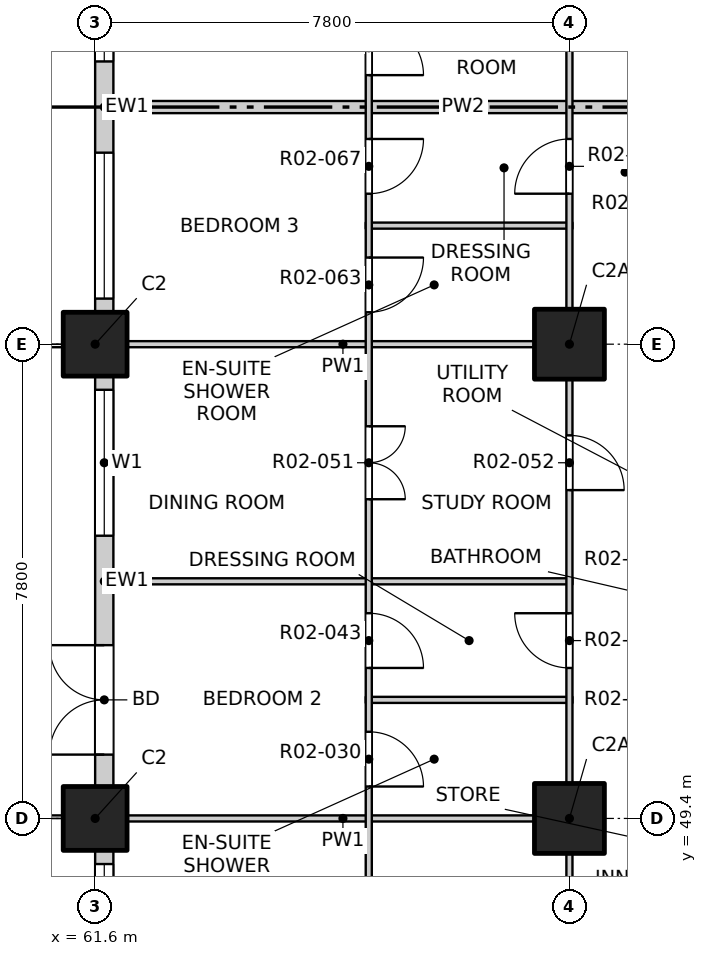
"""IFC4 building model, lengths in metres.
Left out: names, types, materials, properties, quantities, classifications, styles, units other than length and angle.
Written with IfcOpenShell. Run it as: python <this file> out.ifc"""

import sys

from ifc_helpers import new_model, si_unit, direction, frame, frame_2d, origin, origin_2d, place, context, subcontext, project, spatial, rectangle, extrude, element, fill, save


model = new_model("IFC4")
c1 = context("Model", 3, precision=1e-05, world=origin(), true_north=direction((0.0, 1.0)))
c2 = subcontext(c1, "Body", "Model", "MODEL_VIEW")
j1 = project(units=[si_unit("LENGTHUNIT", "METRE"), si_unit("PLANEANGLEUNIT", "RADIAN")], contexts=[c1])
p1 = place(None, origin())
s1 = spatial("IfcSite", under=j1, at=p1, CompositionType="ELEMENT")
p2 = place(p1, origin())
s2 = spatial("IfcBuilding", under=s1, at=p2, CompositionType="ELEMENT")
p3 = place(p2, frame((0.0, 0.0, 36.5)))
s3 = spatial("IfcBuildingStorey", under=s2, at=p3, CompositionType="ELEMENT", Elevation=36.5)
for number, where, z_axis, x_axis in (
    (1, (61.6, 49.4, -0.25), (0.0, 0.0, 1.0), (1.0, 0.0, 0.0)),
    (2, (61.6, 57.2, -0.25), (0.0, 0.0, 1.0), (1.0, 0.0, 0.0)),
):
    element("IfcColumn", number, at=place(p3, frame(where, z_axis=z_axis, x_axis=x_axis)), inside=s3, PredefinedType="COLUMN", context=c2, shape_type="SweptSolid", body=[
        extrude(rectangle(XDim=1.05, YDim=1.05, at=origin_2d()), origin(), (0.0, 0.0, 1.0), 3.4),
    ])
for number, where, z_axis, x_axis in (
    (3, (69.4, 49.4, -0.25), (0.0, 0.0, 1.0), (1.0, 0.0, 0.0)),
    (4, (69.4, 57.2, -0.25), (0.0, 0.0, 1.0), (1.0, 0.0, 0.0)),
):
    element("IfcColumn", number, at=place(p3, frame(where, z_axis=z_axis, x_axis=x_axis)), inside=s3, PredefinedType="COLUMN", context=c2, shape_type="SweptSolid", body=[
        extrude(rectangle(XDim=1.15, YDim=1.15, at=origin_2d()), origin(), (0.0, 0.0, 1.0), 3.4),
    ])
p4 = place(p3, frame((61.75, 45.5, 0.0), z_axis=(0.0, 0.0, 1.0), x_axis=(0.0, 1.0, 0.0)))
e5 = element("IfcWall", 5, at=p4, inside=s3, PredefinedType="SOLIDWALL", context=c2, shape_type="SweptSolid", body=[
    extrude(rectangle(XDim=3.375, YDim=0.3, at=frame_2d((1.688, 0.0))), origin(), (0.0, 0.0, 1.0), 2.7),
])
p5 = place(p4, frame((0.75, 0.0, 0.9)))
e6 = element("IfcOpeningElement", 6, at=p5, cuts=e5, PredefinedType="OPENING", context=c2, shape_type="SweptSolid", body=[
    extrude(rectangle(XDim=2.4, YDim=1.8, at=frame_2d((1.2, 0.9))), frame((0.0, 0.16, 0.0), z_axis=(0.0, -1.0, 0.0), x_axis=(1.0, 0.0, 0.0)), (0.0, 0.0, 1.0), 0.32),
])
p6 = place(p3, frame((61.75, 49.925, 0.0), z_axis=(0.0, 0.0, 1.0), x_axis=(0.0, 1.0, 0.0)))
e7 = element("IfcWall", 7, at=p6, inside=s3, PredefinedType="SOLIDWALL", context=c2, shape_type="SweptSolid", body=[
    extrude(rectangle(XDim=6.75, YDim=0.3, at=frame_2d((3.375, 0.0))), origin(), (0.0, 0.0, 1.0), 2.7),
])
p7 = place(p6, frame((0.525, 0.0, 0.0)))
e8 = element("IfcOpeningElement", 8, at=p7, cuts=e7, PredefinedType="OPENING", context=c2, shape_type="SweptSolid", body=[
    extrude(rectangle(XDim=1.8, YDim=2.4, at=frame_2d((0.9, 1.2))), frame((0.0, 0.16, 0.0), z_axis=(0.0, -1.0, 0.0), x_axis=(1.0, 0.0, 0.0)), (0.0, 0.0, 1.0), 0.32),
])
p8 = place(p6, frame((4.125, 0.0, 0.9)))
e9 = element("IfcOpeningElement", 9, at=p8, cuts=e7, PredefinedType="OPENING", context=c2, shape_type="SweptSolid", body=[
    extrude(rectangle(XDim=2.4, YDim=1.8, at=frame_2d((1.2, 0.9))), frame((0.0, 0.16, 0.0), z_axis=(0.0, -1.0, 0.0), x_axis=(1.0, 0.0, 0.0)), (0.0, 0.0, 1.0), 0.32),
])
p9 = place(p3, frame((61.75, 57.725, 0.0), z_axis=(0.0, 0.0, 1.0), x_axis=(0.0, 1.0, 0.0)))
e10 = element("IfcWall", 10, at=p9, inside=s3, PredefinedType="SOLIDWALL", context=c2, shape_type="SweptSolid", body=[
    extrude(rectangle(XDim=6.75, YDim=0.3, at=frame_2d((3.375, 0.0))), origin(), (0.0, 0.0, 1.0), 2.7),
])
p10 = place(p9, frame((0.225, 0.0, 0.9)))
e11 = element("IfcOpeningElement", 11, at=p10, cuts=e10, PredefinedType="OPENING", context=c2, shape_type="SweptSolid", body=[
    extrude(rectangle(XDim=2.4, YDim=1.8, at=frame_2d((1.2, 0.9))), frame((0.0, 0.16, 0.0), z_axis=(0.0, -1.0, 0.0), x_axis=(1.0, 0.0, 0.0)), (0.0, 0.0, 1.0), 0.32),
])
p11 = place(p9, frame((4.125, 0.0, 0.9)))
e12 = element("IfcOpeningElement", 12, at=p11, cuts=e10, PredefinedType="OPENING", context=c2, shape_type="SweptSolid", body=[
    extrude(rectangle(XDim=2.4, YDim=1.8, at=frame_2d((1.2, 0.9))), frame((0.0, 0.16, 0.0), z_axis=(0.0, -1.0, 0.0), x_axis=(1.0, 0.0, 0.0)), (0.0, 0.0, 1.0), 0.32),
])
p12 = place(p3, frame((61.9, 49.4, 0.0), z_axis=(0.0, 0.0, 1.0), x_axis=(1.0, 0.0, 0.0)))
e13 = element("IfcWall", 13, at=p12, inside=s3, PredefinedType="PARTITIONING", context=c2, shape_type="SweptSolid", body=[
    extrude(rectangle(XDim=7.55, YDim=0.1, at=frame_2d((3.775, 0.0))), origin(), (0.0, 0.0, 1.0), 3.15),
])
p13 = place(p3, frame((66.05, 51.35, 0.0), z_axis=(0.0, 0.0, 1.0), x_axis=(1.0, 0.0, 0.0)))
e14 = element("IfcWall", 14, at=p13, inside=s3, PredefinedType="PARTITIONING", context=c2, shape_type="SweptSolid", body=[
    extrude(rectangle(XDim=3.4, YDim=0.1, at=frame_2d((1.7, 0.0))), origin(), (0.0, 0.0, 1.0), 3.15),
])
p14 = place(p3, frame((61.9, 53.3, 0.0), z_axis=(0.0, 0.0, 1.0), x_axis=(1.0, 0.0, 0.0)))
e15 = element("IfcWall", 15, at=p14, inside=s3, PredefinedType="PARTITIONING", context=c2, shape_type="SweptSolid", body=[
    extrude(rectangle(XDim=7.55, YDim=0.1, at=frame_2d((3.775, 0.0))), origin(), (0.0, 0.0, 1.0), 3.15),
])
p15 = place(p3, frame((61.9, 57.2, 0.0), z_axis=(0.0, 0.0, 1.0), x_axis=(1.0, 0.0, 0.0)))
e16 = element("IfcWall", 16, at=p15, inside=s3, PredefinedType="PARTITIONING", context=c2, shape_type="SweptSolid", body=[
    extrude(rectangle(XDim=7.55, YDim=0.1, at=frame_2d((3.775, 0.0))), origin(), (0.0, 0.0, 1.0), 2.55),
])
p16 = place(p3, frame((66.05, 59.15, 0.0), z_axis=(0.0, 0.0, 1.0), x_axis=(1.0, 0.0, 0.0)))
e17 = element("IfcWall", 17, at=p16, inside=s3, PredefinedType="PARTITIONING", context=c2, shape_type="SweptSolid", body=[
    extrude(rectangle(XDim=3.4, YDim=0.1, at=frame_2d((1.7, 0.0))), origin(), (0.0, 0.0, 1.0), 3.15),
])
p17 = place(p3, frame((61.9, 61.1, 0.0), z_axis=(0.0, 0.0, 1.0), x_axis=(1.0, 0.0, 0.0)))
e18 = element("IfcWall", 18, at=p17, inside=s3, PredefinedType="PARTITIONING", context=c2, shape_type="SweptSolid", body=[
    extrude(rectangle(XDim=11.5, YDim=0.2, at=frame_2d((5.75, 0.0))), origin(), (0.0, 0.0, 1.0), 3.15),
])
p18 = place(p3, frame((66.1, 41.9, 0.0), z_axis=(0.0, 0.0, 1.0), x_axis=(0.0, 1.0, 0.0)))
e19 = element("IfcWall", 19, at=p18, inside=s3, PredefinedType="PARTITIONING", context=c2, shape_type="SweptSolid", body=[
    extrude(rectangle(XDim=34.7, YDim=0.1, at=frame_2d((17.35, 0.0))), origin(), (0.0, 0.0, 1.0), 3.15),
])
p19 = place(p18, frame((1.05, 0.0, 0.0)))
e20 = element("IfcOpeningElement", 20, at=p19, cuts=e19, PredefinedType="OPENING", context=c2, shape_type="SweptSolid", body=[
    extrude(rectangle(XDim=1.2, YDim=2.1, at=frame_2d((0.6, 1.05))), frame((0.0, 0.06, 0.0), z_axis=(0.0, -1.0, 0.0), x_axis=(1.0, 0.0, 0.0)), (0.0, 0.0, 1.0), 0.12),
])
p20 = place(p18, frame((4.95, 0.0, 0.0)))
e21 = element("IfcOpeningElement", 21, at=p20, cuts=e19, PredefinedType="OPENING", context=c2, shape_type="SweptSolid", body=[
    extrude(rectangle(XDim=1.2, YDim=2.1, at=frame_2d((0.6, 1.05))), frame((0.0, 0.06, 0.0), z_axis=(0.0, -1.0, 0.0), x_axis=(1.0, 0.0, 0.0)), (0.0, 0.0, 1.0), 0.12),
])
p21 = place(p18, frame((8.025, 0.0, 0.0)))
e22 = element("IfcOpeningElement", 22, at=p21, cuts=e19, PredefinedType="OPENING", context=c2, shape_type="SweptSolid", body=[
    extrude(rectangle(XDim=0.9, YDim=2.1, at=frame_2d((0.45, 1.05))), frame((0.0, 0.06, 0.0), z_axis=(0.0, -1.0, 0.0), x_axis=(1.0, 0.0, 0.0)), (0.0, 0.0, 1.0), 0.12),
])
p22 = place(p18, frame((9.975, 0.0, 0.0)))
e23 = element("IfcOpeningElement", 23, at=p22, cuts=e19, PredefinedType="OPENING", context=c2, shape_type="SweptSolid", body=[
    extrude(rectangle(XDim=0.9, YDim=2.1, at=frame_2d((0.45, 1.05))), frame((0.0, 0.06, 0.0), z_axis=(0.0, -1.0, 0.0), x_axis=(1.0, 0.0, 0.0)), (0.0, 0.0, 1.0), 0.12),
])
p23 = place(p18, frame((12.75, 0.0, 0.0)))
e24 = element("IfcOpeningElement", 24, at=p23, cuts=e19, PredefinedType="OPENING", context=c2, shape_type="SweptSolid", body=[
    extrude(rectangle(XDim=1.2, YDim=2.1, at=frame_2d((0.6, 1.05))), frame((0.0, 0.06, 0.0), z_axis=(0.0, -1.0, 0.0), x_axis=(1.0, 0.0, 0.0)), (0.0, 0.0, 1.0), 0.12),
])
p24 = place(p18, frame((15.825, 0.0, 0.0)))
e25 = element("IfcOpeningElement", 25, at=p24, cuts=e19, PredefinedType="OPENING", context=c2, shape_type="SweptSolid", body=[
    extrude(rectangle(XDim=0.9, YDim=2.1, at=frame_2d((0.45, 1.05))), frame((0.0, 0.06, 0.0), z_axis=(0.0, -1.0, 0.0), x_axis=(1.0, 0.0, 0.0)), (0.0, 0.0, 1.0), 0.12),
])
p25 = place(p18, frame((17.775, 0.0, 0.0)))
e26 = element("IfcOpeningElement", 26, at=p25, cuts=e19, PredefinedType="OPENING", context=c2, shape_type="SweptSolid", body=[
    extrude(rectangle(XDim=0.9, YDim=2.1, at=frame_2d((0.45, 1.05))), frame((0.0, 0.06, 0.0), z_axis=(0.0, -1.0, 0.0), x_axis=(1.0, 0.0, 0.0)), (0.0, 0.0, 1.0), 0.12),
])
p26 = place(p18, frame((19.725, 0.0, 0.0)))
e27 = element("IfcOpeningElement", 27, at=p26, cuts=e19, PredefinedType="OPENING", context=c2, shape_type="SweptSolid", body=[
    extrude(rectangle(XDim=0.9, YDim=2.1, at=frame_2d((0.45, 1.05))), frame((0.0, 0.06, 0.0), z_axis=(0.0, -1.0, 0.0), x_axis=(1.0, 0.0, 0.0)), (0.0, 0.0, 1.0), 0.12),
])
p27 = place(p18, frame((21.675, 0.0, 0.0)))
e28 = element("IfcOpeningElement", 28, at=p27, cuts=e19, PredefinedType="OPENING", context=c2, shape_type="SweptSolid", body=[
    extrude(rectangle(XDim=0.9, YDim=2.1, at=frame_2d((0.45, 1.05))), frame((0.0, 0.06, 0.0), z_axis=(0.0, -1.0, 0.0), x_axis=(1.0, 0.0, 0.0)), (0.0, 0.0, 1.0), 0.12),
])
p28 = place(p18, frame((24.45, 0.0, 0.0)))
e29 = element("IfcOpeningElement", 29, at=p28, cuts=e19, PredefinedType="OPENING", context=c2, shape_type="SweptSolid", body=[
    extrude(rectangle(XDim=1.2, YDim=2.1, at=frame_2d((0.6, 1.05))), frame((0.0, 0.06, 0.0), z_axis=(0.0, -1.0, 0.0), x_axis=(1.0, 0.0, 0.0)), (0.0, 0.0, 1.0), 0.12),
])
p29 = place(p18, frame((27.525, 0.0, 0.0)))
e30 = element("IfcOpeningElement", 30, at=p29, cuts=e19, PredefinedType="OPENING", context=c2, shape_type="SweptSolid", body=[
    extrude(rectangle(XDim=0.9, YDim=2.1, at=frame_2d((0.45, 1.05))), frame((0.0, 0.06, 0.0), z_axis=(0.0, -1.0, 0.0), x_axis=(1.0, 0.0, 0.0)), (0.0, 0.0, 1.0), 0.12),
])
p30 = place(p18, frame((29.475, 0.0, 0.0)))
e31 = element("IfcOpeningElement", 31, at=p30, cuts=e19, PredefinedType="OPENING", context=c2, shape_type="SweptSolid", body=[
    extrude(rectangle(XDim=0.9, YDim=2.1, at=frame_2d((0.45, 1.05))), frame((0.0, 0.06, 0.0), z_axis=(0.0, -1.0, 0.0), x_axis=(1.0, 0.0, 0.0)), (0.0, 0.0, 1.0), 0.12),
])
p31 = place(p18, frame((31.425, 0.0, 0.0)))
e32 = element("IfcOpeningElement", 32, at=p31, cuts=e19, PredefinedType="OPENING", context=c2, shape_type="SweptSolid", body=[
    extrude(rectangle(XDim=0.9, YDim=2.1, at=frame_2d((0.45, 1.05))), frame((0.0, 0.06, 0.0), z_axis=(0.0, -1.0, 0.0), x_axis=(1.0, 0.0, 0.0)), (0.0, 0.0, 1.0), 0.12),
])
p32 = place(p18, frame((33.375, 0.0, 0.0)))
e33 = element("IfcOpeningElement", 33, at=p32, cuts=e19, PredefinedType="OPENING", context=c2, shape_type="SweptSolid", body=[
    extrude(rectangle(XDim=0.9, YDim=2.1, at=frame_2d((0.45, 1.05))), frame((0.0, 0.06, 0.0), z_axis=(0.0, -1.0, 0.0), x_axis=(1.0, 0.0, 0.0)), (0.0, 0.0, 1.0), 0.12),
])
p33 = place(p3, frame((69.4, 41.9, 0.0), z_axis=(0.0, 0.0, 1.0), x_axis=(0.0, 1.0, 0.0)))
e34 = element("IfcWall", 34, at=p33, inside=s3, PredefinedType="PARTITIONING", context=c2, shape_type="SweptSolid", body=[
    extrude(rectangle(XDim=46.2, YDim=0.1, at=frame_2d((23.1, 0.0))), origin(), (0.0, 0.0, 1.0), 3.15),
])
p34 = place(p33, frame((1.2, 0.0, 0.0)))
e35 = element("IfcOpeningElement", 35, at=p34, cuts=e34, PredefinedType="OPENING", context=c2, shape_type="SweptSolid", body=[
    extrude(rectangle(XDim=0.9, YDim=2.1, at=frame_2d((0.45, 1.05))), frame((0.0, 0.06, 0.0), z_axis=(0.0, -1.0, 0.0), x_axis=(1.0, 0.0, 0.0)), (0.0, 0.0, 1.0), 0.12),
])
p35 = place(p33, frame((5.1, 0.0, 0.0)))
e36 = element("IfcOpeningElement", 36, at=p35, cuts=e34, PredefinedType="OPENING", context=c2, shape_type="SweptSolid", body=[
    extrude(rectangle(XDim=0.9, YDim=2.1, at=frame_2d((0.45, 1.05))), frame((0.0, 0.06, 0.0), z_axis=(0.0, -1.0, 0.0), x_axis=(1.0, 0.0, 0.0)), (0.0, 0.0, 1.0), 0.12),
])
p36 = place(p33, frame((9.975, 0.0, 0.0)))
e37 = element("IfcOpeningElement", 37, at=p36, cuts=e34, PredefinedType="OPENING", context=c2, shape_type="SweptSolid", body=[
    extrude(rectangle(XDim=0.9, YDim=2.1, at=frame_2d((0.45, 1.05))), frame((0.0, 0.06, 0.0), z_axis=(0.0, -1.0, 0.0), x_axis=(1.0, 0.0, 0.0)), (0.0, 0.0, 1.0), 0.12),
])
p37 = place(p33, frame((12.9, 0.0, 0.0)))
e38 = element("IfcOpeningElement", 38, at=p37, cuts=e34, PredefinedType="OPENING", context=c2, shape_type="SweptSolid", body=[
    extrude(rectangle(XDim=0.9, YDim=2.1, at=frame_2d((0.45, 1.05))), frame((0.0, 0.06, 0.0), z_axis=(0.0, -1.0, 0.0), x_axis=(1.0, 0.0, 0.0)), (0.0, 0.0, 1.0), 0.12),
])
p38 = place(p33, frame((17.775, 0.0, 0.0)))
e39 = element("IfcOpeningElement", 39, at=p38, cuts=e34, PredefinedType="OPENING", context=c2, shape_type="SweptSolid", body=[
    extrude(rectangle(XDim=0.9, YDim=2.1, at=frame_2d((0.45, 1.05))), frame((0.0, 0.06, 0.0), z_axis=(0.0, -1.0, 0.0), x_axis=(1.0, 0.0, 0.0)), (0.0, 0.0, 1.0), 0.12),
])
p39 = place(p33, frame((21.5, 0.0, 0.0)))
e40 = element("IfcOpeningElement", 40, at=p39, cuts=e34, PredefinedType="OPENING", context=c2, shape_type="SweptSolid", body=[
    extrude(rectangle(XDim=0.9, YDim=2.1, at=frame_2d((0.45, 1.05))), frame((0.0, 0.06, 0.0), z_axis=(0.0, -1.0, 0.0), x_axis=(1.0, 0.0, 0.0)), (0.0, 0.0, 1.0), 0.12),
])
p40 = place(p33, frame((24.6, 0.0, 0.0)))
e41 = element("IfcOpeningElement", 41, at=p40, cuts=e34, PredefinedType="OPENING", context=c2, shape_type="SweptSolid", body=[
    extrude(rectangle(XDim=0.9, YDim=2.1, at=frame_2d((0.45, 1.05))), frame((0.0, 0.06, 0.0), z_axis=(0.0, -1.0, 0.0), x_axis=(1.0, 0.0, 0.0)), (0.0, 0.0, 1.0), 0.12),
])
p41 = place(p33, frame((29.3, 0.0, 0.0)))
e42 = element("IfcOpeningElement", 42, at=p41, cuts=e34, PredefinedType="OPENING", context=c2, shape_type="SweptSolid", body=[
    extrude(rectangle(XDim=0.9, YDim=2.1, at=frame_2d((0.45, 1.05))), frame((0.0, 0.06, 0.0), z_axis=(0.0, -1.0, 0.0), x_axis=(1.0, 0.0, 0.0)), (0.0, 0.0, 1.0), 0.12),
])
p42 = place(p33, frame((33.375, 0.0, 0.0)))
e43 = element("IfcOpeningElement", 43, at=p42, cuts=e34, PredefinedType="OPENING", context=c2, shape_type="SweptSolid", body=[
    extrude(rectangle(XDim=0.9, YDim=2.1, at=frame_2d((0.45, 1.05))), frame((0.0, 0.06, 0.0), z_axis=(0.0, -1.0, 0.0), x_axis=(1.0, 0.0, 0.0)), (0.0, 0.0, 1.0), 0.12),
])
p43 = place(p33, frame((37.1, 0.0, 0.0)))
e44 = element("IfcOpeningElement", 44, at=p43, cuts=e34, PredefinedType="OPENING", context=c2, shape_type="SweptSolid", body=[
    extrude(rectangle(XDim=0.9, YDim=2.1, at=frame_2d((0.45, 1.05))), frame((0.0, 0.06, 0.0), z_axis=(0.0, -1.0, 0.0), x_axis=(1.0, 0.0, 0.0)), (0.0, 0.0, 1.0), 0.12),
])
p44 = place(p33, frame((41.175, 0.0, 0.0)))
e45 = element("IfcOpeningElement", 45, at=p44, cuts=e34, PredefinedType="OPENING", context=c2, shape_type="SweptSolid", body=[
    extrude(rectangle(XDim=0.9, YDim=2.1, at=frame_2d((0.45, 1.05))), frame((0.0, 0.06, 0.0), z_axis=(0.0, -1.0, 0.0), x_axis=(1.0, 0.0, 0.0)), (0.0, 0.0, 1.0), 0.12),
])
p45 = place(p33, frame((44.1, 0.0, 0.0)))
e46 = element("IfcOpeningElement", 46, at=p45, cuts=e34, PredefinedType="OPENING", context=c2, shape_type="SweptSolid", body=[
    extrude(rectangle(XDim=0.9, YDim=2.1, at=frame_2d((0.45, 1.05))), frame((0.0, 0.06, 0.0), z_axis=(0.0, -1.0, 0.0), x_axis=(1.0, 0.0, 0.0)), (0.0, 0.0, 1.0), 0.12),
])
p46 = place(p5, origin())
e47 = element("IfcWindow", 47, at=p46, inside=s3, PartitioningType="DOUBLE_PANEL_VERTICAL", PredefinedType="WINDOW", context=c2, shape_type="SweptSolid", body=[
    extrude(rectangle(XDim=2.4, YDim=1.8, at=frame_2d((1.2, 0.9))), frame((0.0, 0.03, 0.0), z_axis=(0.0, -1.0, 0.0), x_axis=(1.0, 0.0, 0.0)), (0.0, 0.0, 1.0), 0.06),
])
fill(e6, e47)
p47 = place(p7, origin())
e48 = element("IfcDoor", 48, at=p47, inside=s3, OperationType="DOUBLE_DOOR_SINGLE_SWING", PredefinedType="DOOR", context=c2, shape_type="SweptSolid", body=[
    extrude(rectangle(XDim=1.8, YDim=2.4, at=frame_2d((0.9, 1.2))), frame((0.0, 0.025, 0.0), z_axis=(0.0, -1.0, 0.0), x_axis=(1.0, 0.0, 0.0)), (0.0, 0.0, 1.0), 0.05),
])
fill(e8, e48)
p48 = place(p8, origin())
e49 = element("IfcWindow", 49, at=p48, inside=s3, PartitioningType="DOUBLE_PANEL_VERTICAL", PredefinedType="WINDOW", context=c2, shape_type="SweptSolid", body=[
    extrude(rectangle(XDim=2.4, YDim=1.8, at=frame_2d((1.2, 0.9))), frame((0.0, 0.03, 0.0), z_axis=(0.0, -1.0, 0.0), x_axis=(1.0, 0.0, 0.0)), (0.0, 0.0, 1.0), 0.06),
])
fill(e9, e49)
p49 = place(p10, origin())
e50 = element("IfcWindow", 50, at=p49, inside=s3, PartitioningType="DOUBLE_PANEL_VERTICAL", PredefinedType="WINDOW", context=c2, shape_type="SweptSolid", body=[
    extrude(rectangle(XDim=2.4, YDim=1.8, at=frame_2d((1.2, 0.9))), frame((0.0, 0.03, 0.0), z_axis=(0.0, -1.0, 0.0), x_axis=(1.0, 0.0, 0.0)), (0.0, 0.0, 1.0), 0.06),
])
fill(e11, e50)
p50 = place(p11, origin())
e51 = element("IfcWindow", 51, at=p50, inside=s3, PartitioningType="DOUBLE_PANEL_VERTICAL", PredefinedType="WINDOW", context=c2, shape_type="SweptSolid", body=[
    extrude(rectangle(XDim=2.4, YDim=1.8, at=frame_2d((1.2, 0.9))), frame((0.0, 0.03, 0.0), z_axis=(0.0, -1.0, 0.0), x_axis=(1.0, 0.0, 0.0)), (0.0, 0.0, 1.0), 0.06),
])
fill(e12, e51)
p51 = place(p21, origin())
e52 = element("IfcDoor", 52, at=p51, inside=s3, OperationType="SINGLE_SWING_RIGHT", PredefinedType="DOOR", context=c2, shape_type="SweptSolid", body=[
    extrude(rectangle(XDim=0.9, YDim=2.1, at=frame_2d((0.45, 1.05))), frame((0.0, 0.025, 0.0), z_axis=(0.0, -1.0, 0.0), x_axis=(1.0, 0.0, 0.0)), (0.0, 0.0, 1.0), 0.05),
])
fill(e22, e52)
p52 = place(p22, origin())
e53 = element("IfcDoor", 53, at=p52, inside=s3, OperationType="SINGLE_SWING_RIGHT", PredefinedType="DOOR", context=c2, shape_type="SweptSolid", body=[
    extrude(rectangle(XDim=0.9, YDim=2.1, at=frame_2d((0.45, 1.05))), frame((0.0, 0.025, 0.0), z_axis=(0.0, -1.0, 0.0), x_axis=(1.0, 0.0, 0.0)), (0.0, 0.0, 1.0), 0.05),
])
fill(e23, e53)
p53 = place(p36, origin())
e54 = element("IfcDoor", 54, at=p53, inside=s3, OperationType="SINGLE_SWING_RIGHT", PredefinedType="DOOR", context=c2, shape_type="SweptSolid", body=[
    extrude(rectangle(XDim=0.9, YDim=2.1, at=frame_2d((0.45, 1.05))), frame((0.0, 0.025, 0.0), z_axis=(0.0, -1.0, 0.0), x_axis=(1.0, 0.0, 0.0)), (0.0, 0.0, 1.0), 0.05),
])
fill(e37, e54)
p54 = place(p23, origin())
e55 = element("IfcDoor", 55, at=p54, inside=s3, OperationType="DOUBLE_DOOR_SINGLE_SWING", PredefinedType="DOOR", context=c2, shape_type="SweptSolid", body=[
    extrude(rectangle(XDim=1.2, YDim=2.1, at=frame_2d((0.6, 1.05))), frame((0.0, 0.025, 0.0), z_axis=(0.0, -1.0, 0.0), x_axis=(1.0, 0.0, 0.0)), (0.0, 0.0, 1.0), 0.05),
])
fill(e24, e55)
p55 = place(p37, origin())
e56 = element("IfcDoor", 56, at=p55, inside=s3, OperationType="SINGLE_SWING_RIGHT", PredefinedType="DOOR", context=c2, shape_type="SweptSolid", body=[
    extrude(rectangle(XDim=0.9, YDim=2.1, at=frame_2d((0.45, 1.05))), frame((0.0, 0.025, 0.0), z_axis=(0.0, -1.0, 0.0), x_axis=(1.0, 0.0, 0.0)), (0.0, 0.0, 1.0), 0.05),
])
fill(e38, e56)
p56 = place(p24, origin())
e57 = element("IfcDoor", 57, at=p56, inside=s3, OperationType="SINGLE_SWING_LEFT", PredefinedType="DOOR", context=c2, shape_type="SweptSolid", body=[
    extrude(rectangle(XDim=0.9, YDim=2.1, at=frame_2d((0.45, 1.05))), frame((0.0, 0.025, 0.0), z_axis=(0.0, -1.0, 0.0), x_axis=(1.0, 0.0, 0.0)), (0.0, 0.0, 1.0), 0.05),
])
fill(e25, e57)
p57 = place(p25, origin())
e58 = element("IfcDoor", 58, at=p57, inside=s3, OperationType="SINGLE_SWING_LEFT", PredefinedType="DOOR", context=c2, shape_type="SweptSolid", body=[
    extrude(rectangle(XDim=0.9, YDim=2.1, at=frame_2d((0.45, 1.05))), frame((0.0, 0.025, 0.0), z_axis=(0.0, -1.0, 0.0), x_axis=(1.0, 0.0, 0.0)), (0.0, 0.0, 1.0), 0.05),
])
fill(e26, e58)
p58 = place(p38, origin())
e59 = element("IfcDoor", 59, at=p58, inside=s3, OperationType="SINGLE_SWING_LEFT", PredefinedType="DOOR", context=c2, shape_type="SweptSolid", body=[
    extrude(rectangle(XDim=0.9, YDim=2.1, at=frame_2d((0.45, 1.05))), frame((0.0, 0.025, 0.0), z_axis=(0.0, -1.0, 0.0), x_axis=(1.0, 0.0, 0.0)), (0.0, 0.0, 1.0), 0.05),
])
fill(e39, e59)
p59 = place(p26, origin())
e60 = element("IfcDoor", 60, at=p59, inside=s3, OperationType="SINGLE_SWING_RIGHT", PredefinedType="DOOR", context=c2, shape_type="SweptSolid", body=[
    extrude(rectangle(XDim=0.9, YDim=2.1, at=frame_2d((0.45, 1.05))), frame((0.0, 0.025, 0.0), z_axis=(0.0, -1.0, 0.0), x_axis=(1.0, 0.0, 0.0)), (0.0, 0.0, 1.0), 0.05),
])
fill(e27, e60)
save(model, sys.argv[1])
